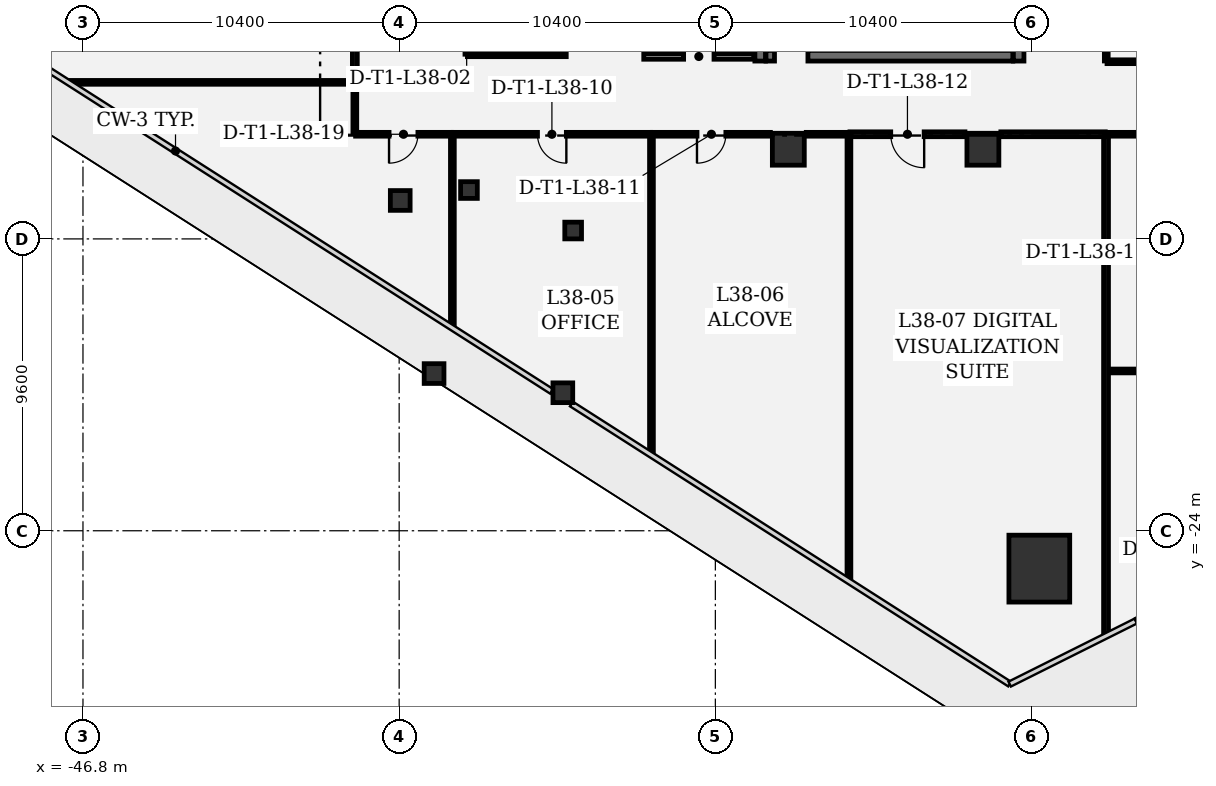
"""IFC4 building model, lengths in metres.
Left out: names, types, materials, properties, quantities, classifications, styles, units other than length and angle.
Written with IfcOpenShell. Run it as: python <this file> out.ifc"""

import sys

from ifc_helpers import new_model, si_unit, direction, frame, frame_2d, origin, origin_2d, place, context, subcontext, project, spatial, rectangle, extrude, element, fill, save


model = new_model("IFC4")
c1 = context("Model", 3, precision=1e-05, world=origin(), true_north=direction((0.0, 1.0)))
c2 = subcontext(c1, "Body", "Model", "MODEL_VIEW")
j1 = project(units=[si_unit("LENGTHUNIT", "METRE"), si_unit("PLANEANGLEUNIT", "RADIAN")], contexts=[c1])
p1 = place(None, origin())
s1 = spatial("IfcSite", under=j1, at=p1, CompositionType="ELEMENT")
p2 = place(p1, origin())
s2 = spatial("IfcBuilding", under=s1, at=p2, CompositionType="ELEMENT")
p3 = place(p2, frame((0.0, 0.0, 166.5)))
s3 = spatial("IfcBuildingStorey", under=s2, at=p3, CompositionType="ELEMENT", Elevation=166.5)
p4 = place(p3, frame((-15.344, -25.246, 0.0), z_axis=(0.0, 0.0, 1.0), x_axis=(1.0, 0.0, 0.0)))
e1 = element("IfcColumn", 1, at=p4, inside=s3, PredefinedType="COLUMN", context=c2, shape_type="SweptSolid", body=[
    extrude(rectangle(XDim=2.0, YDim=2.2, at=origin_2d()), origin(), (0.0, 0.0, 1.0), 4.05),
])
for number, where, z_axis, x_axis in (
    (2, (-17.2, -11.45, 0.0), (0.0, 0.0, 1.0), (1.0, 0.0, 0.0)),
    (3, (-23.6, -11.45, 0.0), (0.0, 0.0, 1.0), (1.0, 0.0, 0.0)),
):
    element("IfcColumn", number, at=place(p3, frame(where, z_axis=z_axis, x_axis=x_axis)), inside=s3, PredefinedType="COLUMN", context=c2, shape_type="SweptSolid", body=[
        extrude(rectangle(XDim=1.05, YDim=1.05, at=origin_2d()), origin(), (0.0, 0.0, 1.0), 4.05),
    ])
for number, where, z_axis, x_axis in (
    (4, (-35.252, -18.829, 0.0), (0.0, 0.0, 1.0), (1.0, 0.0, 0.0)),
    (5, (-31.016, -19.46, 0.0), (0.0, 0.0, 1.0), (1.0, 0.0, 0.0)),
    (6, (-36.365, -13.135, 0.0), (0.0, 0.0, 1.0), (1.0, 0.0, 0.0)),
):
    element("IfcColumn", number, at=place(p3, frame(where, z_axis=z_axis, x_axis=x_axis)), inside=s3, PredefinedType="COLUMN", context=c2, shape_type="SweptSolid", body=[
        extrude(rectangle(XDim=0.65, YDim=0.65, at=origin_2d()), origin(), (0.0, 0.0, 1.0), 4.05),
    ])
for number, where, z_axis, x_axis in (
    (7, (-34.104, -12.792, 0.0), (0.0, 0.0, 1.0), (1.0, 0.0, 0.0)),
    (8, (-30.677, -14.124, 0.0), (0.0, 0.0, 1.0), (1.0, 0.0, 0.0)),
):
    element("IfcColumn", number, at=place(p3, frame(where, z_axis=z_axis, x_axis=x_axis)), inside=s3, PredefinedType="COLUMN", context=c2, shape_type="SweptSolid", body=[
        extrude(rectangle(XDim=0.55, YDim=0.55, at=origin_2d()), origin(), (0.0, 0.0, 1.0), 4.05),
    ])
for number, where, z_axis, x_axis in (
    (9, (-24.525, -4.34, 0.0), (0.0, 0.0, 1.0), (0.0, -1.0, 0.0)),
    (10, (-16.025, -8.55, 0.0), (0.0, 0.0, 1.0), (0.0, 1.0, 0.0)),
):
    element("IfcWall", number, at=place(p3, frame(where, z_axis=z_axis, x_axis=x_axis)), inside=s3, PredefinedType="SHEAR", context=c2, shape_type="SweptSolid", body=[
        extrude(rectangle(XDim=4.21, YDim=0.35, at=frame_2d((2.105, 0.0))), origin(), (0.0, 0.0, 1.0), 3.78),
    ])
p5 = place(p3, frame((-24.335, -8.375, 0.0), z_axis=(0.0, 0.0, 1.0), x_axis=(1.0, 0.0, 0.0)))
e11 = element("IfcWall", 11, at=p5, inside=s3, PredefinedType="SHEAR", context=c2, shape_type="SweptSolid", body=[
    extrude(rectangle(XDim=8.12, YDim=0.35, at=frame_2d((4.06, 0.0))), origin(), (0.0, 0.0, 1.0), 3.78),
])
p6 = place(p5, frame((0.28, 0.0, 0.0)))
e12 = element("IfcOpeningElement", 12, at=p6, cuts=e11, PredefinedType="OPENING", context=c2, shape_type="SweptSolid", body=[
    extrude(rectangle(XDim=1.1, YDim=2.2, at=frame_2d((0.55, 1.1))), frame((0.0, 0.185, 0.0), z_axis=(0.0, -1.0, 0.0), x_axis=(1.0, 0.0, 0.0)), (0.0, 0.0, 1.0), 0.37),
])
p7 = place(p3, frame((-28.355, -8.4, 0.0), z_axis=(0.0, 0.0, 1.0), x_axis=(1.0, 0.0, 0.0)))
e13 = element("IfcWall", 13, at=p7, inside=s3, PredefinedType="PARTITIONING", context=c2, shape_type="SweptSolid", body=[
    extrude(rectangle(XDim=3.622, YDim=0.18, at=frame_2d((1.811, 0.0))), origin(), (0.0, 0.0, 1.0), 3.78),
])
p8 = place(p7, frame((1.311, 0.0, 0.0)))
e14 = element("IfcOpeningElement", 14, at=p8, cuts=e13, PredefinedType="OPENING", context=c2, shape_type="SweptSolid", body=[
    extrude(rectangle(XDim=1.0, YDim=2.15, at=frame_2d((0.5, 1.075))), frame((0.0, 0.1, 0.0), z_axis=(0.0, -1.0, 0.0), x_axis=(1.0, 0.0, 0.0)), (0.0, 0.0, 1.0), 0.2),
])
p9 = place(p3, frame((-34.18, -6.225, 0.0), z_axis=(0.0, 0.0, 1.0), x_axis=(0.0, -1.0, 0.0)))
e15 = element("IfcWall", 15, at=p9, inside=s3, PredefinedType="PARTITIONING", context=c2, shape_type="SweptSolid", body=[
    extrude(rectangle(XDim=2.1, YDim=0.11, at=frame_2d((1.05, 0.0))), origin(), (0.0, 0.0, 1.0), 3.78),
])
p10 = place(p9, frame((0.61, 0.0, 0.0)))
e16 = element("IfcOpeningElement", 16, at=p10, cuts=e15, PredefinedType="OPENING", context=c2, shape_type="SweptSolid", body=[
    extrude(rectangle(XDim=0.88, YDim=2.1, at=frame_2d((0.44, 1.05))), frame((0.0, 0.065, 0.0), z_axis=(0.0, -1.0, 0.0), x_axis=(1.0, 0.0, 0.0)), (0.0, 0.0, 1.0), 0.13),
])
p11 = place(p3, frame((-34.155, -8.35, 0.0), z_axis=(0.0, 0.0, 1.0), x_axis=(1.0, 0.0, 0.0)))
e17 = element("IfcWall", 17, at=p11, inside=s3, PredefinedType="PARTITIONING", context=c2, shape_type="SweptSolid", body=[
    extrude(rectangle(XDim=3.25, YDim=0.11, at=frame_2d((1.625, 0.0))), origin(), (0.0, 0.0, 1.0), 3.78),
])
p12 = place(p3, frame((-28.102, -21.433, 0.0), z_axis=(0.0, 0.0, 1.0), x_axis=(0.0, 1.0, 0.0)))
e18 = element("IfcWall", 18, at=p12, inside=s3, PredefinedType="PARTITIONING", context=c2, shape_type="SweptSolid", body=[
    extrude(rectangle(XDim=10.45, YDim=0.125, at=frame_2d((5.225, 0.0))), origin(), (0.0, 0.0, 1.0), 3.344),
])
p13 = place(p3, frame((-28.127, -10.958, 0.0), z_axis=(0.0, 0.0, 1.0), x_axis=(-1.0, 0.0, 0.0)))
e19 = element("IfcWall", 19, at=p13, inside=s3, PredefinedType="PARTITIONING", context=c2, shape_type="SweptSolid", body=[
    extrude(rectangle(XDim=6.498, YDim=0.125, at=frame_2d((3.249, 0.0))), origin(), (0.0, 0.0, 1.0), 3.78),
])
p14 = place(p13, frame((2.774, 0.0, 0.0)))
e20 = element("IfcOpeningElement", 20, at=p14, cuts=e19, PredefinedType="OPENING", context=c2, shape_type="SweptSolid", body=[
    extrude(rectangle(XDim=0.95, YDim=2.15, at=frame_2d((0.475, 1.075))), frame((0.0, 0.073, 0.0), z_axis=(0.0, -1.0, 0.0), x_axis=(1.0, 0.0, 0.0)), (0.0, 0.0, 1.0), 0.145),
])
p15 = place(p3, frame((-34.65, -10.983, 0.0), z_axis=(0.0, 0.0, 1.0), x_axis=(0.0, -1.0, 0.0)))
e21 = element("IfcWall", 21, at=p15, inside=s3, PredefinedType="PARTITIONING", context=c2, shape_type="SweptSolid", body=[
    extrude(rectangle(XDim=6.265, YDim=0.125, at=frame_2d((3.132, 0.0))), origin(), (0.0, 0.0, 1.0), 3.78),
])
p16 = place(p3, frame((-24.19, -10.958, 0.0), z_axis=(0.0, 0.0, 1.0), x_axis=(-1.0, 0.0, 0.0)))
e22 = element("IfcWall", 22, at=p16, inside=s3, PredefinedType="PARTITIONING", context=c2, shape_type="SweptSolid", body=[
    extrude(rectangle(XDim=3.879, YDim=0.125, at=frame_2d((1.939, 0.0))), origin(), (0.0, 0.0, 1.0), 3.78),
])
p17 = place(p16, frame((1.464, 0.0, 0.0)))
e23 = element("IfcOpeningElement", 23, at=p17, cuts=e22, PredefinedType="OPENING", context=c2, shape_type="SweptSolid", body=[
    extrude(rectangle(XDim=0.95, YDim=2.15, at=frame_2d((0.475, 1.075))), frame((0.0, 0.073, 0.0), z_axis=(0.0, -1.0, 0.0), x_axis=(1.0, 0.0, 0.0)), (0.0, 0.0, 1.0), 0.145),
])
p18 = place(p3, frame((-21.606, -25.584, 0.0), z_axis=(0.0, 0.0, 1.0), x_axis=(0.0, 1.0, 0.0)))
e24 = element("IfcWall", 24, at=p18, inside=s3, PredefinedType="PARTITIONING", context=c2, shape_type="SweptSolid", body=[
    extrude(rectangle(XDim=14.602, YDim=0.125, at=frame_2d((7.301, 0.0))), origin(), (0.0, 0.0, 1.0), 2.895),
])
p19 = place(p3, frame((-21.631, -10.958, 0.0), z_axis=(0.0, 0.0, 1.0), x_axis=(-1.0, 0.0, 0.0)))
e25 = element("IfcWall", 25, at=p19, inside=s3, PredefinedType="PARTITIONING", context=c2, shape_type="SweptSolid", body=[
    extrude(rectangle(XDim=1.379, YDim=0.125, at=frame_2d((0.689, 0.0))), origin(), (0.0, 0.0, 1.0), 3.78),
])
p20 = place(p3, frame((-17.79, -10.958, 0.0), z_axis=(0.0, 0.0, 1.0), x_axis=(-1.0, 0.0, 0.0)))
e26 = element("IfcWall", 26, at=p20, inside=s3, PredefinedType="PARTITIONING", context=c2, shape_type="SweptSolid", body=[
    extrude(rectangle(XDim=3.783, YDim=0.16, at=frame_2d((1.892, 0.0))), origin(), (0.0, 0.0, 1.0), 3.78),
])
p21 = place(p20, frame((1.342, 0.0, 0.0)))
e27 = element("IfcOpeningElement", 27, at=p21, cuts=e26, PredefinedType="OPENING", context=c2, shape_type="SweptSolid", body=[
    extrude(rectangle(XDim=1.1, YDim=2.15, at=frame_2d((0.55, 1.075))), frame((0.0, 0.09, 0.0), z_axis=(0.0, -1.0, 0.0), x_axis=(1.0, 0.0, 0.0)), (0.0, 0.0, 1.0), 0.18),
])
p22 = place(p3, frame((-13.15, -27.379, 0.0), z_axis=(0.0, 0.0, 1.0), x_axis=(0.0, 1.0, 0.0)))
e28 = element("IfcWall", 28, at=p22, inside=s3, PredefinedType="PARTITIONING", context=c2, shape_type="SweptSolid", body=[
    extrude(rectangle(XDim=16.396, YDim=0.16, at=frame_2d((8.198, 0.0))), origin(), (0.0, 0.0, 1.0), 2.9),
])
p23 = place(p3, frame((-13.175, -10.958, 0.0), z_axis=(0.0, 0.0, 1.0), x_axis=(-1.0, 0.0, 0.0)))
e29 = element("IfcWall", 29, at=p23, inside=s3, PredefinedType="PARTITIONING", context=c2, shape_type="SweptSolid", body=[
    extrude(rectangle(XDim=3.435, YDim=0.16, at=frame_2d((1.718, 0.0))), origin(), (0.0, 0.0, 1.0), 2.895),
])
p24 = place(p3, frame((-10.633, -18.744, 0.0), z_axis=(0.0, 0.0, 1.0), x_axis=(-1.0, 0.0, 0.0)))
e30 = element("IfcWall", 30, at=p24, inside=s3, PredefinedType="PARTITIONING", context=c2, shape_type="SweptSolid", body=[
    extrude(rectangle(XDim=2.407, YDim=0.125, at=frame_2d((1.204, 0.0))), origin(), (0.0, 0.0, 1.0), 3.78),
])
p25 = place(p3, frame((-10.633, -10.958, 0.0), z_axis=(0.0, 0.0, 1.0), x_axis=(-1.0, 0.0, 0.0)))
e31 = element("IfcWall", 31, at=p25, inside=s3, PredefinedType="PARTITIONING", context=c2, shape_type="SweptSolid", body=[
    extrude(rectangle(XDim=2.484, YDim=0.125, at=frame_2d((1.242, 0.0))), origin(), (0.0, 0.0, 1.0), 3.78),
])
p26 = place(p3, frame((-13.142, -0.814, 0.0), z_axis=(0.0, 0.0, 1.0), x_axis=(0.0, -1.0, 0.0)))
e32 = element("IfcWall", 32, at=p26, inside=s3, PredefinedType="PARTITIONING", context=c2, shape_type="SweptSolid", body=[
    extrude(rectangle(XDim=7.733, YDim=0.125, at=frame_2d((3.866, 0.0))), origin(), (0.0, 0.0, 1.0), 3.78),
])
p27 = place(p26, frame((3.391, 0.0, 0.0)))
e33 = element("IfcOpeningElement", 33, at=p27, cuts=e32, PredefinedType="OPENING", context=c2, shape_type="SweptSolid", body=[
    extrude(rectangle(XDim=0.95, YDim=2.15, at=frame_2d((0.475, 1.075))), frame((0.0, 0.073, 0.0), z_axis=(0.0, -1.0, 0.0), x_axis=(1.0, 0.0, 0.0)), (0.0, 0.0, 1.0), 0.145),
])
p28 = place(p3, frame((-13.117, -8.572, 0.0), z_axis=(0.0, 0.0, 1.0), x_axis=(1.0, 0.0, 0.0)))
e34 = element("IfcWall", 34, at=p28, inside=s3, PredefinedType="PARTITIONING", context=c2, shape_type="SweptSolid", body=[
    extrude(rectangle(XDim=5.1, YDim=0.125, at=frame_2d((2.55, 0.0))), origin(), (0.0, 0.0, 1.0), 2.895),
])
p29 = place(p3, frame((-34.683, -10.958, 0.0), z_axis=(0.0, 0.0, 1.0), x_axis=(-1.0, 0.0, 0.0)))
e35 = element("IfcWall", 35, at=p29, inside=s3, PredefinedType="PARTITIONING", context=c2, shape_type="SweptSolid", body=[
    extrude(rectangle(XDim=3.15, YDim=0.125, at=frame_2d((1.575, 0.0))), origin(), (0.0, 0.0, 1.0), 3.344),
])
p30 = place(p29, frame((1.1, 0.0, 0.0)))
e36 = element("IfcOpeningElement", 36, at=p30, cuts=e35, PredefinedType="OPENING", context=c2, shape_type="SweptSolid", body=[
    extrude(rectangle(XDim=0.95, YDim=2.15, at=frame_2d((0.475, 1.075))), frame((0.0, 0.073, 0.0), z_axis=(0.0, -1.0, 0.0), x_axis=(1.0, 0.0, 0.0)), (0.0, 0.0, 1.0), 0.145),
])
p31 = place(p3, frame((-37.858, -10.933, 0.0), z_axis=(0.0, 0.0, 1.0), x_axis=(0.0, 1.0, 0.0)))
e37 = element("IfcWall", 37, at=p31, inside=s3, PredefinedType="PARTITIONING", context=c2, shape_type="SweptSolid", body=[
    extrude(rectangle(XDim=1.658, YDim=0.125, at=frame_2d((0.829, 0.0))), origin(), (0.0, 0.0, 1.0), 3.78),
])
p32 = place(p3, frame((-37.883, -9.25, 0.0), z_axis=(0.0, 0.0, 1.0), x_axis=(-1.0, 0.0, 0.0)))
e38 = element("IfcWall", 38, at=p32, inside=s3, PredefinedType="PARTITIONING", context=c2, shape_type="SweptSolid", body=[
    extrude(rectangle(XDim=9.325, YDim=0.125, at=frame_2d((4.663, 0.0))), origin(), (0.0, 0.0, 1.0), 2.9),
])
p33 = place(p3, frame((-37.858, -9.217, 0.0), z_axis=(0.0, 0.0, 1.0), x_axis=(0.0, 1.0, 0.0)))
e39 = element("IfcWall", 39, at=p33, inside=s3, PredefinedType="PARTITIONING", context=c2, shape_type="SweptSolid", body=[
    extrude(rectangle(XDim=4.434, YDim=0.16, at=frame_2d((2.217, 0.0))), origin(), (0.0, 0.0, 1.0), 3.78),
])
p34 = place(p33, frame((1.742, 0.0, 0.0)))
e40 = element("IfcOpeningElement", 40, at=p34, cuts=e39, PredefinedType="OPENING", context=c2, shape_type="SweptSolid", body=[
    extrude(rectangle(XDim=0.95, YDim=2.15, at=frame_2d((0.475, 1.075))), frame((0.0, 0.09, 0.0), z_axis=(0.0, -1.0, 0.0), x_axis=(1.0, 0.0, 0.0)), (0.0, 0.0, 1.0), 0.18),
])
p35 = place(p6, origin())
e41 = element("IfcDoor", 41, at=p35, inside=s3, OperationType="SINGLE_SWING_LEFT", PredefinedType="DOOR", context=c2, shape_type="SweptSolid", body=[
    extrude(rectangle(XDim=1.1, YDim=2.2, at=frame_2d((0.55, 1.1))), frame((0.0, 0.025, 0.0), z_axis=(0.0, -1.0, 0.0), x_axis=(1.0, 0.0, 0.0)), (0.0, 0.0, 1.0), 0.05),
])
fill(e12, e41)
p36 = place(p14, origin())
e42 = element("IfcDoor", 42, at=p36, inside=s3, OperationType="SINGLE_SWING_LEFT", PredefinedType="DOOR", context=c2, shape_type="SweptSolid", body=[
    extrude(rectangle(XDim=0.95, YDim=2.15, at=frame_2d((0.475, 1.075))), frame((0.0, 0.025, 0.0), z_axis=(0.0, -1.0, 0.0), x_axis=(1.0, 0.0, 0.0)), (0.0, 0.0, 1.0), 0.05),
])
fill(e20, e42)
p37 = place(p17, origin())
e43 = element("IfcDoor", 43, at=p37, inside=s3, OperationType="SINGLE_SWING_RIGHT", PredefinedType="DOOR", context=c2, shape_type="SweptSolid", body=[
    extrude(rectangle(XDim=0.95, YDim=2.15, at=frame_2d((0.475, 1.075))), frame((0.0, 0.025, 0.0), z_axis=(0.0, -1.0, 0.0), x_axis=(1.0, 0.0, 0.0)), (0.0, 0.0, 1.0), 0.05),
])
fill(e23, e43)
p38 = place(p21, origin())
e44 = element("IfcDoor", 44, at=p38, inside=s3, OperationType="SINGLE_SWING_LEFT", PredefinedType="DOOR", context=c2, shape_type="SweptSolid", body=[
    extrude(rectangle(XDim=1.1, YDim=2.15, at=frame_2d((0.55, 1.075))), frame((0.0, 0.025, 0.0), z_axis=(0.0, -1.0, 0.0), x_axis=(1.0, 0.0, 0.0)), (0.0, 0.0, 1.0), 0.05),
])
fill(e27, e44)
p39 = place(p30, origin())
e45 = element("IfcDoor", 45, at=p39, inside=s3, OperationType="SINGLE_SWING_RIGHT", PredefinedType="DOOR", context=c2, shape_type="SweptSolid", body=[
    extrude(rectangle(XDim=0.95, YDim=2.15, at=frame_2d((0.475, 1.075))), frame((0.0, 0.025, 0.0), z_axis=(0.0, -1.0, 0.0), x_axis=(1.0, 0.0, 0.0)), (0.0, 0.0, 1.0), 0.05),
])
fill(e36, e45)
p40 = place(p8, origin())
e46 = element("IfcDoor", 46, at=p40, inside=s3, OperationType="SINGLE_SWING_LEFT", PredefinedType="DOOR", context=c2, shape_type="SweptSolid", body=[
    extrude(rectangle(XDim=1.0, YDim=2.15, at=frame_2d((0.5, 1.075))), frame((0.0, 0.025, 0.0), z_axis=(0.0, -1.0, 0.0), x_axis=(1.0, 0.0, 0.0)), (0.0, 0.0, 1.0), 0.05),
])
fill(e14, e46)
save(model, sys.argv[1])
